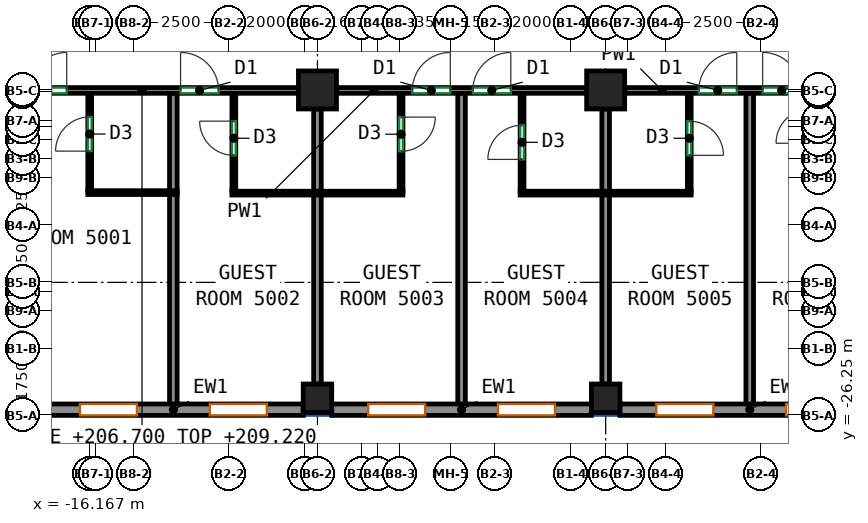
"""IFC4 building model, lengths in metres.
Left out: names, types, materials, properties, quantities, classifications, styles, units other than length and angle.
Written with IfcOpenShell. Run it as: python <this file> out.ifc"""

import sys

from ifc_helpers import new_model, si_unit, direction, frame, frame_2d, origin, origin_2d, place, context, subcontext, project, spatial, rectangle, extrude, source, transform, mapped, element, fill, save


model = new_model("IFC4")
c1 = context("Model", 3, precision=1e-05, world=origin(), true_north=direction((0.0, 1.0)))
c2 = subcontext(c1, "Body", "Model", "MODEL_VIEW")
j1 = project(units=[si_unit("LENGTHUNIT", "METRE"), si_unit("PLANEANGLEUNIT", "RADIAN")], contexts=[c1])
p1 = place(None, origin())
s1 = spatial("IfcSite", under=j1, at=p1, CompositionType="ELEMENT")
p2 = place(p1, origin())
s2 = spatial("IfcBuilding", under=s1, at=p2, CompositionType="ELEMENT")
p3 = place(p2, frame((0.0, 0.0, 206.7)))
s3 = spatial("IfcBuildingStorey", under=s2, at=p3, CompositionType="ELEMENT", Elevation=206.7)
m1 = source(origin(), c2, "Body", "SweptSolid", [
    extrude(rectangle(XDim=0.75, YDim=0.75, at=origin_2d()), origin(), (0.0, 0.0, 1.0), 3.12),
])
p4 = place(p3, frame((-10.167, -25.8, 0.0), z_axis=(0.0, 0.0, 1.0), x_axis=(1.0, 0.0, 0.0)))
e1 = element("IfcColumn", 1, at=p4, inside=s3, PredefinedType="COLUMN", context=c2, shape_type="MappedRepresentation", body=[
    mapped(m1, transform((0.0, 0.0, 0.0))),
])
m2 = source(origin(), c2, "Body", "SweptSolid", [
    extrude(rectangle(XDim=1.0, YDim=1.0, at=origin_2d()), origin(), (0.0, 0.0, 1.0), 3.12),
])
p5 = place(p3, frame((-10.167, -17.688, 0.0), z_axis=(0.0, 0.0, 1.0), x_axis=(1.0, 0.0, 0.0)))
e2 = element("IfcColumn", 2, at=p5, inside=s3, PredefinedType="COLUMN", context=c2, shape_type="MappedRepresentation", body=[
    mapped(m2, transform((0.0, 0.0, 0.0))),
])
p6 = place(p3, frame((-2.583, -25.8, 0.0), z_axis=(0.0, 0.0, 1.0), x_axis=(1.0, 0.0, 0.0)))
e3 = element("IfcColumn", 3, at=p6, inside=s3, PredefinedType="COLUMN", context=c2, shape_type="MappedRepresentation", body=[
    mapped(m1, transform((0.0, 0.0, 0.0))),
])
p7 = place(p3, frame((-2.583, -17.688, 0.0), z_axis=(0.0, 0.0, 1.0), x_axis=(1.0, 0.0, 0.0)))
e4 = element("IfcColumn", 4, at=p7, inside=s3, PredefinedType="COLUMN", context=c2, shape_type="MappedRepresentation", body=[
    mapped(m2, transform((0.0, 0.0, 0.0))),
])
m3 = source(origin(), c2, "Body", "SweptSolid", [
    extrude(rectangle(XDim=6.833, YDim=0.3, at=frame_2d((3.417, 0.0))), origin(), (0.0, 0.0, 1.0), 3.12),
])
p8 = place(p3, frame((-17.375, -26.1, 0.0), z_axis=(0.0, 0.0, 1.0), x_axis=(1.0, 0.0, 0.0)))
e5 = element("IfcWall", 5, at=p8, inside=s3, PredefinedType="SOLIDWALL", context=c2, shape_type="MappedRepresentation", body=[
    mapped(m3, transform((0.0, 0.0, 0.0))),
])
p9 = place(p8, frame((0.958, 0.0, 0.85)))
e6 = element("IfcOpeningElement", 6, at=p9, cuts=e5, PredefinedType="OPENING", context=c2, shape_type="SweptSolid", body=[
    extrude(rectangle(XDim=1.5, YDim=1.95, at=frame_2d((0.75, 0.975))), frame((0.0, 0.16, 0.0), z_axis=(0.0, -1.0, 0.0), x_axis=(1.0, 0.0, 0.0)), (0.0, 0.0, 1.0), 0.32),
])
p10 = place(p8, frame((4.375, 0.0, 0.85)))
e7 = element("IfcOpeningElement", 7, at=p10, cuts=e5, PredefinedType="OPENING", context=c2, shape_type="SweptSolid", body=[
    extrude(rectangle(XDim=1.5, YDim=1.95, at=frame_2d((0.75, 0.975))), frame((0.0, 0.16, 0.0), z_axis=(0.0, -1.0, 0.0), x_axis=(1.0, 0.0, 0.0)), (0.0, 0.0, 1.0), 0.32),
])
m4 = source(origin(), c2, "Body", "SweptSolid", [
    extrude(rectangle(XDim=6.833, YDim=0.3, at=frame_2d((3.417, 0.0))), origin(), (0.0, 0.0, 1.0), 3.12),
])
p11 = place(p3, frame((-9.792, -26.1, 0.0), z_axis=(0.0, 0.0, 1.0), x_axis=(1.0, 0.0, 0.0)))
e8 = element("IfcWall", 8, at=p11, inside=s3, PredefinedType="SOLIDWALL", context=c2, shape_type="MappedRepresentation", body=[
    mapped(m4, transform((0.0, 0.0, 0.0))),
])
p12 = place(p11, frame((0.958, 0.0, 0.85)))
e9 = element("IfcOpeningElement", 9, at=p12, cuts=e8, PredefinedType="OPENING", context=c2, shape_type="SweptSolid", body=[
    extrude(rectangle(XDim=1.5, YDim=1.95, at=frame_2d((0.75, 0.975))), frame((0.0, 0.16, 0.0), z_axis=(0.0, -1.0, 0.0), x_axis=(1.0, 0.0, 0.0)), (0.0, 0.0, 1.0), 0.32),
])
p13 = place(p11, frame((4.375, 0.0, 0.85)))
e10 = element("IfcOpeningElement", 10, at=p13, cuts=e8, PredefinedType="OPENING", context=c2, shape_type="SweptSolid", body=[
    extrude(rectangle(XDim=1.5, YDim=1.95, at=frame_2d((0.75, 0.975))), frame((0.0, 0.16, 0.0), z_axis=(0.0, -1.0, 0.0), x_axis=(1.0, 0.0, 0.0)), (0.0, 0.0, 1.0), 0.32),
])
p14 = place(p3, frame((-2.208, -26.1, 0.0), z_axis=(0.0, 0.0, 1.0), x_axis=(1.0, 0.0, 0.0)))
e11 = element("IfcWall", 11, at=p14, inside=s3, PredefinedType="SOLIDWALL", context=c2, shape_type="MappedRepresentation", body=[
    mapped(m3, transform((0.0, 0.0, 0.0))),
])
p15 = place(p14, frame((0.958, 0.0, 0.85)))
e12 = element("IfcOpeningElement", 12, at=p15, cuts=e11, PredefinedType="OPENING", context=c2, shape_type="SweptSolid", body=[
    extrude(rectangle(XDim=1.5, YDim=1.95, at=frame_2d((0.75, 0.975))), frame((0.0, 0.16, 0.0), z_axis=(0.0, -1.0, 0.0), x_axis=(1.0, 0.0, 0.0)), (0.0, 0.0, 1.0), 0.32),
])
p16 = place(p14, frame((4.375, 0.0, 0.85)))
e13 = element("IfcOpeningElement", 13, at=p16, cuts=e11, PredefinedType="OPENING", context=c2, shape_type="SweptSolid", body=[
    extrude(rectangle(XDim=1.5, YDim=1.95, at=frame_2d((0.75, 0.975))), frame((0.0, 0.16, 0.0), z_axis=(0.0, -1.0, 0.0), x_axis=(1.0, 0.0, 0.0)), (0.0, 0.0, 1.0), 0.32),
])
p17 = place(p3, frame((-18.9, -17.7, 0.0), z_axis=(0.0, 0.0, 1.0), x_axis=(1.0, 0.0, 0.0)))
e14 = element("IfcWall", 14, at=p17, inside=s3, PredefinedType="PARTITIONING", context=c2, shape_type="SweptSolid", body=[
    extrude(rectangle(XDim=8.233, YDim=0.15, at=frame_2d((4.116, 0.0))), origin(), (0.0, 0.0, 1.0), 2.52),
])
p18 = place(p17, frame((1.135, 0.0, 0.0)))
e15 = element("IfcOpeningElement", 15, at=p18, cuts=e14, PredefinedType="OPENING", context=c2, shape_type="SweptSolid", body=[
    extrude(rectangle(XDim=1.0, YDim=2.1, at=frame_2d((0.5, 1.05))), frame((0.0, 0.085, 0.0), z_axis=(0.0, -1.0, 0.0), x_axis=(1.0, 0.0, 0.0)), (0.0, 0.0, 1.0), 0.17),
])
p19 = place(p17, frame((5.131, 0.0, 0.0)))
e16 = element("IfcOpeningElement", 16, at=p19, cuts=e14, PredefinedType="OPENING", context=c2, shape_type="SweptSolid", body=[
    extrude(rectangle(XDim=1.0, YDim=2.1, at=frame_2d((0.5, 1.05))), frame((0.0, 0.085, 0.0), z_axis=(0.0, -1.0, 0.0), x_axis=(1.0, 0.0, 0.0)), (0.0, 0.0, 1.0), 0.17),
])
p20 = place(p3, frame((-9.667, -17.7, 0.0), z_axis=(0.0, 0.0, 1.0), x_axis=(1.0, 0.0, 0.0)))
e17 = element("IfcWall", 17, at=p20, inside=s3, PredefinedType="PARTITIONING", context=c2, shape_type="SweptSolid", body=[
    extrude(rectangle(XDim=6.584, YDim=0.15, at=frame_2d((3.292, 0.0))), origin(), (0.0, 0.0, 1.0), 3.12),
])
p21 = place(p20, frame((1.996, 0.0, 0.0)))
e18 = element("IfcOpeningElement", 18, at=p21, cuts=e17, PredefinedType="OPENING", context=c2, shape_type="SweptSolid", body=[
    extrude(rectangle(XDim=1.0, YDim=2.1, at=frame_2d((0.5, 1.05))), frame((0.0, 0.085, 0.0), z_axis=(0.0, -1.0, 0.0), x_axis=(1.0, 0.0, 0.0)), (0.0, 0.0, 1.0), 0.17),
])
p22 = place(p20, frame((3.588, 0.0, 0.0)))
e19 = element("IfcOpeningElement", 19, at=p22, cuts=e17, PredefinedType="OPENING", context=c2, shape_type="SweptSolid", body=[
    extrude(rectangle(XDim=1.0, YDim=2.1, at=frame_2d((0.5, 1.05))), frame((0.0, 0.085, 0.0), z_axis=(0.0, -1.0, 0.0), x_axis=(1.0, 0.0, 0.0)), (0.0, 0.0, 1.0), 0.17),
])
p23 = place(p3, frame((-2.083, -17.7, 0.0), z_axis=(0.0, 0.0, 1.0), x_axis=(1.0, 0.0, 0.0)))
e20 = element("IfcWall", 20, at=p23, inside=s3, PredefinedType="PARTITIONING", context=c2, shape_type="SweptSolid", body=[
    extrude(rectangle(XDim=6.583, YDim=0.15, at=frame_2d((3.292, 0.0))), origin(), (0.0, 0.0, 1.0), 3.12),
])
p24 = place(p23, frame((1.95, 0.0, 0.0)))
e21 = element("IfcOpeningElement", 21, at=p24, cuts=e20, PredefinedType="OPENING", context=c2, shape_type="SweptSolid", body=[
    extrude(rectangle(XDim=1.0, YDim=2.1, at=frame_2d((0.5, 1.05))), frame((0.0, 0.085, 0.0), z_axis=(0.0, -1.0, 0.0), x_axis=(1.0, 0.0, 0.0)), (0.0, 0.0, 1.0), 0.17),
])
p25 = place(p23, frame((3.632, 0.0, 0.0)))
e22 = element("IfcOpeningElement", 22, at=p25, cuts=e20, PredefinedType="OPENING", context=c2, shape_type="SweptSolid", body=[
    extrude(rectangle(XDim=1.0, YDim=2.1, at=frame_2d((0.5, 1.05))), frame((0.0, 0.085, 0.0), z_axis=(0.0, -1.0, 0.0), x_axis=(1.0, 0.0, 0.0)), (0.0, 0.0, 1.0), 0.17),
])
p26 = place(p3, frame((-16.159, -20.338, 0.0), z_axis=(0.0, 0.0, 1.0), x_axis=(0.0, 1.0, 0.0)))
e23 = element("IfcWall", 23, at=p26, inside=s3, PredefinedType="PARTITIONING", context=c2, shape_type="SweptSolid", body=[
    extrude(rectangle(XDim=2.561, YDim=0.1, at=frame_2d((1.28, 0.0))), origin(), (0.0, 0.0, 1.0), 3.12),
])
p27 = place(p26, frame((1.041, 0.0, 0.0)))
e24 = element("IfcOpeningElement", 24, at=p27, cuts=e23, PredefinedType="OPENING", context=c2, shape_type="SweptSolid", body=[
    extrude(rectangle(XDim=0.9, YDim=2.1, at=frame_2d((0.45, 1.05))), frame((0.0, 0.06, 0.0), z_axis=(0.0, -1.0, 0.0), x_axis=(1.0, 0.0, 0.0)), (0.0, 0.0, 1.0), 0.12),
])
p28 = place(p3, frame((-16.209, -20.388, 0.0), z_axis=(0.0, 0.0, 1.0), x_axis=(1.0, 0.0, 0.0)))
e25 = element("IfcWall", 25, at=p28, inside=s3, PredefinedType="PARTITIONING", context=c2, shape_type="SweptSolid", body=[
    extrude(rectangle(XDim=2.35, YDim=0.1, at=frame_2d((1.175, 0.0))), origin(), (0.0, 0.0, 1.0), 3.12),
])
p29 = place(p3, frame((-13.959, -26.0, 0.0), z_axis=(0.0, 0.0, 1.0), x_axis=(0.0, 1.0, 0.0)))
e26 = element("IfcWall", 26, at=p29, inside=s3, PredefinedType="PARTITIONING", context=c2, shape_type="SweptSolid", body=[
    extrude(rectangle(XDim=5.562, YDim=0.2, at=frame_2d((2.781, 0.0))), origin(), (0.0, 0.0, 1.0), 3.12),
])
p30 = place(p3, frame((-13.959, -20.338, 0.0), z_axis=(0.0, 0.0, 1.0), x_axis=(0.0, 1.0, 0.0)))
e27 = element("IfcWall", 27, at=p30, inside=s3, PredefinedType="PARTITIONING", context=c2, shape_type="SweptSolid", body=[
    extrude(rectangle(XDim=2.561, YDim=0.2, at=frame_2d((1.28, 0.0))), origin(), (0.0, 0.0, 1.0), 3.12),
])
p31 = place(p3, frame((-12.367, -20.352, 0.0), z_axis=(0.0, 0.0, 1.0), x_axis=(0.0, 1.0, 0.0)))
e28 = element("IfcWall", 28, at=p31, inside=s3, PredefinedType="PARTITIONING", context=c2, shape_type="SweptSolid", body=[
    extrude(rectangle(XDim=2.575, YDim=0.1, at=frame_2d((1.288, 0.0))), origin(), (0.0, 0.0, 1.0), 3.12),
])
p32 = place(p31, frame((0.944, 0.0, 0.0)))
e29 = element("IfcOpeningElement", 29, at=p32, cuts=e28, PredefinedType="OPENING", context=c2, shape_type="SweptSolid", body=[
    extrude(rectangle(XDim=0.9, YDim=2.1, at=frame_2d((0.45, 1.05))), frame((0.0, 0.06, 0.0), z_axis=(0.0, -1.0, 0.0), x_axis=(1.0, 0.0, 0.0)), (0.0, 0.0, 1.0), 0.12),
])
p33 = place(p3, frame((-12.417, -20.402, 0.0), z_axis=(0.0, 0.0, 1.0), x_axis=(1.0, 0.0, 0.0)))
e30 = element("IfcWall", 30, at=p33, inside=s3, PredefinedType="PARTITIONING", context=c2, shape_type="SweptSolid", body=[
    extrude(rectangle(XDim=4.5, YDim=0.1, at=frame_2d((2.25, 0.0))), origin(), (0.0, 0.0, 1.0), 3.12),
])
p34 = place(p3, frame((-10.167, -25.425, 0.0), z_axis=(0.0, 0.0, 1.0), x_axis=(0.0, 1.0, 0.0)))
e31 = element("IfcWall", 31, at=p34, inside=s3, PredefinedType="PARTITIONING", context=c2, shape_type="SweptSolid", body=[
    extrude(rectangle(XDim=4.973, YDim=0.2, at=frame_2d((2.487, 0.0))), origin(), (0.0, 0.0, 1.0), 3.12),
])
p35 = place(p3, frame((-10.167, -20.352, 0.0), z_axis=(0.0, 0.0, 1.0), x_axis=(0.0, 1.0, 0.0)))
e32 = element("IfcWall", 32, at=p35, inside=s3, PredefinedType="PARTITIONING", context=c2, shape_type="SweptSolid", body=[
    extrude(rectangle(XDim=2.164, YDim=0.2, at=frame_2d((1.082, 0.0))), origin(), (0.0, 0.0, 1.0), 3.12),
])
p36 = place(p3, frame((-7.967, -17.777, 0.0), z_axis=(0.0, 0.0, 1.0), x_axis=(0.0, -1.0, 0.0)))
e33 = element("IfcWall", 33, at=p36, inside=s3, PredefinedType="PARTITIONING", context=c2, shape_type="SweptSolid", body=[
    extrude(rectangle(XDim=2.575, YDim=0.1, at=frame_2d((1.288, 0.0))), origin(), (0.0, 0.0, 1.0), 3.12),
])
p37 = place(p36, frame((0.625, 0.0, 0.0)))
e34 = element("IfcOpeningElement", 34, at=p37, cuts=e33, PredefinedType="OPENING", context=c2, shape_type="SweptSolid", body=[
    extrude(rectangle(XDim=0.9, YDim=2.1, at=frame_2d((0.45, 1.05))), frame((0.0, 0.06, 0.0), z_axis=(0.0, -1.0, 0.0), x_axis=(1.0, 0.0, 0.0)), (0.0, 0.0, 1.0), 0.12),
])
p38 = place(p3, frame((-6.375, -26.0, 0.0), z_axis=(0.0, 0.0, 1.0), x_axis=(0.0, 1.0, 0.0)))
e35 = element("IfcWall", 35, at=p38, inside=s3, PredefinedType="PARTITIONING", context=c2, shape_type="SweptSolid", body=[
    extrude(rectangle(XDim=8.223, YDim=0.2, at=frame_2d((4.111, 0.0))), origin(), (0.0, 0.0, 1.0), 3.12),
])
p39 = place(p3, frame((-4.783, -20.352, 0.0), z_axis=(0.0, 0.0, 1.0), x_axis=(0.0, 1.0, 0.0)))
e36 = element("IfcWall", 36, at=p39, inside=s3, PredefinedType="PARTITIONING", context=c2, shape_type="SweptSolid", body=[
    extrude(rectangle(XDim=2.575, YDim=0.1, at=frame_2d((1.288, 0.0))), origin(), (0.0, 0.0, 1.0), 3.12),
])
p40 = place(p39, frame((0.837, 0.0, 0.0)))
e37 = element("IfcOpeningElement", 37, at=p40, cuts=e36, PredefinedType="OPENING", context=c2, shape_type="SweptSolid", body=[
    extrude(rectangle(XDim=0.9, YDim=2.1, at=frame_2d((0.45, 1.05))), frame((0.0, 0.06, 0.0), z_axis=(0.0, -1.0, 0.0), x_axis=(1.0, 0.0, 0.0)), (0.0, 0.0, 1.0), 0.12),
])
p41 = place(p3, frame((-4.833, -20.402, 0.0), z_axis=(0.0, 0.0, 1.0), x_axis=(1.0, 0.0, 0.0)))
e38 = element("IfcWall", 38, at=p41, inside=s3, PredefinedType="PARTITIONING", context=c2, shape_type="SweptSolid", body=[
    extrude(rectangle(XDim=4.5, YDim=0.1, at=frame_2d((2.25, 0.0))), origin(), (0.0, 0.0, 1.0), 3.12),
])
p42 = place(p3, frame((-2.583, -25.425, 0.0), z_axis=(0.0, 0.0, 1.0), x_axis=(0.0, 1.0, 0.0)))
e39 = element("IfcWall", 39, at=p42, inside=s3, PredefinedType="PARTITIONING", context=c2, shape_type="SweptSolid", body=[
    extrude(rectangle(XDim=4.973, YDim=0.2, at=frame_2d((2.487, 0.0))), origin(), (0.0, 0.0, 1.0), 3.12),
])
p43 = place(p3, frame((-2.583, -20.352, 0.0), z_axis=(0.0, 0.0, 1.0), x_axis=(0.0, 1.0, 0.0)))
e40 = element("IfcWall", 40, at=p43, inside=s3, PredefinedType="PARTITIONING", context=c2, shape_type="SweptSolid", body=[
    extrude(rectangle(XDim=2.164, YDim=0.2, at=frame_2d((1.082, 0.0))), origin(), (0.0, 0.0, 1.0), 3.12),
])
p44 = place(p3, frame((-0.383, -17.777, 0.0), z_axis=(0.0, 0.0, 1.0), x_axis=(0.0, -1.0, 0.0)))
e41 = element("IfcWall", 41, at=p44, inside=s3, PredefinedType="PARTITIONING", context=c2, shape_type="SweptSolid", body=[
    extrude(rectangle(XDim=2.575, YDim=0.1, at=frame_2d((1.288, 0.0))), origin(), (0.0, 0.0, 1.0), 3.12),
])
p45 = place(p44, frame((0.731, 0.0, 0.0)))
e42 = element("IfcOpeningElement", 42, at=p45, cuts=e41, PredefinedType="OPENING", context=c2, shape_type="SweptSolid", body=[
    extrude(rectangle(XDim=0.9, YDim=2.1, at=frame_2d((0.45, 1.05))), frame((0.0, 0.06, 0.0), z_axis=(0.0, -1.0, 0.0), x_axis=(1.0, 0.0, 0.0)), (0.0, 0.0, 1.0), 0.12),
])
p46 = place(p3, frame((1.208, -26.0, 0.0), z_axis=(0.0, 0.0, 1.0), x_axis=(0.0, 1.0, 0.0)))
e43 = element("IfcWall", 43, at=p46, inside=s3, PredefinedType="PARTITIONING", context=c2, shape_type="SweptSolid", body=[
    extrude(rectangle(XDim=8.223, YDim=0.2, at=frame_2d((4.111, 0.0))), origin(), (0.0, 0.0, 1.0), 3.12),
])
p47 = place(p9, origin())
e44 = element("IfcWindow", 44, at=p47, inside=s3, PartitioningType="SINGLE_PANEL", PredefinedType="WINDOW", context=c2, shape_type="SweptSolid", body=[
    extrude(rectangle(XDim=1.5, YDim=1.95, at=frame_2d((0.75, 0.975))), frame((0.0, 0.03, 0.0), z_axis=(0.0, -1.0, 0.0), x_axis=(1.0, 0.0, 0.0)), (0.0, 0.0, 1.0), 0.06),
])
fill(e6, e44)
p48 = place(p10, origin())
e45 = element("IfcWindow", 45, at=p48, inside=s3, PartitioningType="SINGLE_PANEL", PredefinedType="WINDOW", context=c2, shape_type="SweptSolid", body=[
    extrude(rectangle(XDim=1.5, YDim=1.95, at=frame_2d((0.75, 0.975))), frame((0.0, 0.03, 0.0), z_axis=(0.0, -1.0, 0.0), x_axis=(1.0, 0.0, 0.0)), (0.0, 0.0, 1.0), 0.06),
])
fill(e7, e45)
p49 = place(p12, origin())
e46 = element("IfcWindow", 46, at=p49, inside=s3, PartitioningType="SINGLE_PANEL", PredefinedType="WINDOW", context=c2, shape_type="SweptSolid", body=[
    extrude(rectangle(XDim=1.5, YDim=1.95, at=frame_2d((0.75, 0.975))), frame((0.0, 0.03, 0.0), z_axis=(0.0, -1.0, 0.0), x_axis=(1.0, 0.0, 0.0)), (0.0, 0.0, 1.0), 0.06),
])
fill(e9, e46)
p50 = place(p13, origin())
e47 = element("IfcWindow", 47, at=p50, inside=s3, PartitioningType="SINGLE_PANEL", PredefinedType="WINDOW", context=c2, shape_type="SweptSolid", body=[
    extrude(rectangle(XDim=1.5, YDim=1.95, at=frame_2d((0.75, 0.975))), frame((0.0, 0.03, 0.0), z_axis=(0.0, -1.0, 0.0), x_axis=(1.0, 0.0, 0.0)), (0.0, 0.0, 1.0), 0.06),
])
fill(e10, e47)
p51 = place(p15, origin())
e48 = element("IfcWindow", 48, at=p51, inside=s3, PartitioningType="SINGLE_PANEL", PredefinedType="WINDOW", context=c2, shape_type="SweptSolid", body=[
    extrude(rectangle(XDim=1.5, YDim=1.95, at=frame_2d((0.75, 0.975))), frame((0.0, 0.03, 0.0), z_axis=(0.0, -1.0, 0.0), x_axis=(1.0, 0.0, 0.0)), (0.0, 0.0, 1.0), 0.06),
])
fill(e12, e48)
p52 = place(p16, origin())
e49 = element("IfcWindow", 49, at=p52, inside=s3, PartitioningType="SINGLE_PANEL", PredefinedType="WINDOW", context=c2, shape_type="SweptSolid", body=[
    extrude(rectangle(XDim=1.5, YDim=1.95, at=frame_2d((0.75, 0.975))), frame((0.0, 0.03, 0.0), z_axis=(0.0, -1.0, 0.0), x_axis=(1.0, 0.0, 0.0)), (0.0, 0.0, 1.0), 0.06),
])
fill(e13, e49)
p53 = place(p40, origin())
e50 = element("IfcDoor", 50, at=p53, inside=s3, OperationType="SINGLE_SWING_LEFT", PredefinedType="DOOR", context=c2, shape_type="SweptSolid", body=[
    extrude(rectangle(XDim=0.9, YDim=2.1, at=frame_2d((0.45, 1.05))), frame((0.0, 0.025, 0.0), z_axis=(0.0, -1.0, 0.0), x_axis=(1.0, 0.0, 0.0)), (0.0, 0.0, 1.0), 0.05),
])
fill(e37, e50)
p54 = place(p32, origin())
e51 = element("IfcDoor", 51, at=p54, inside=s3, OperationType="SINGLE_SWING_RIGHT", PredefinedType="DOOR", context=c2, shape_type="SweptSolid", body=[
    extrude(rectangle(XDim=0.9, YDim=2.1, at=frame_2d((0.45, 1.05))), frame((0.0, 0.025, 0.0), z_axis=(0.0, -1.0, 0.0), x_axis=(1.0, 0.0, 0.0)), (0.0, 0.0, 1.0), 0.05),
])
fill(e29, e51)
p55 = place(p45, origin())
e52 = element("IfcDoor", 52, at=p55, inside=s3, OperationType="SINGLE_SWING_RIGHT", PredefinedType="DOOR", context=c2, shape_type="SweptSolid", body=[
    extrude(rectangle(XDim=0.9, YDim=2.1, at=frame_2d((0.45, 1.05))), frame((0.0, 0.025, 0.0), z_axis=(0.0, -1.0, 0.0), x_axis=(1.0, 0.0, 0.0)), (0.0, 0.0, 1.0), 0.05),
])
fill(e42, e52)
p56 = place(p27, origin())
e53 = element("IfcDoor", 53, at=p56, inside=s3, OperationType="SINGLE_SWING_LEFT", PredefinedType="DOOR", context=c2, shape_type="SweptSolid", body=[
    extrude(rectangle(XDim=0.9, YDim=2.1, at=frame_2d((0.45, 1.05))), frame((0.0, 0.025, 0.0), z_axis=(0.0, -1.0, 0.0), x_axis=(1.0, 0.0, 0.0)), (0.0, 0.0, 1.0), 0.05),
])
fill(e24, e53)
p57 = place(p37, origin())
e54 = element("IfcDoor", 54, at=p57, inside=s3, OperationType="SINGLE_SWING_LEFT", PredefinedType="DOOR", context=c2, shape_type="SweptSolid", body=[
    extrude(rectangle(XDim=0.9, YDim=2.1, at=frame_2d((0.45, 1.05))), frame((0.0, 0.025, 0.0), z_axis=(0.0, -1.0, 0.0), x_axis=(1.0, 0.0, 0.0)), (0.0, 0.0, 1.0), 0.05),
])
fill(e34, e54)
p58 = place(p18, origin())
e55 = element("IfcDoor", 55, at=p58, inside=s3, OperationType="SINGLE_SWING_RIGHT", PredefinedType="DOOR", context=c2, shape_type="SweptSolid", body=[
    extrude(rectangle(XDim=1.0, YDim=2.1, at=frame_2d((0.5, 1.05))), frame((0.0, 0.025, 0.0), z_axis=(0.0, -1.0, 0.0), x_axis=(1.0, 0.0, 0.0)), (0.0, 0.0, 1.0), 0.05),
])
fill(e15, e55)
p59 = place(p19, origin())
e56 = element("IfcDoor", 56, at=p59, inside=s3, OperationType="SINGLE_SWING_LEFT", PredefinedType="DOOR", context=c2, shape_type="SweptSolid", body=[
    extrude(rectangle(XDim=1.0, YDim=2.1, at=frame_2d((0.5, 1.05))), frame((0.0, 0.025, 0.0), z_axis=(0.0, -1.0, 0.0), x_axis=(1.0, 0.0, 0.0)), (0.0, 0.0, 1.0), 0.05),
])
fill(e16, e56)
p60 = place(p21, origin())
e57 = element("IfcDoor", 57, at=p60, inside=s3, OperationType="SINGLE_SWING_RIGHT", PredefinedType="DOOR", context=c2, shape_type="SweptSolid", body=[
    extrude(rectangle(XDim=1.0, YDim=2.1, at=frame_2d((0.5, 1.05))), frame((0.0, 0.025, 0.0), z_axis=(0.0, -1.0, 0.0), x_axis=(1.0, 0.0, 0.0)), (0.0, 0.0, 1.0), 0.05),
])
fill(e18, e57)
p61 = place(p22, origin())
e58 = element("IfcDoor", 58, at=p61, inside=s3, OperationType="SINGLE_SWING_RIGHT", PredefinedType="DOOR", context=c2, shape_type="SweptSolid", body=[
    extrude(rectangle(XDim=1.0, YDim=2.1, at=frame_2d((0.5, 1.05))), frame((0.0, 0.025, 0.0), z_axis=(0.0, -1.0, 0.0), x_axis=(1.0, 0.0, 0.0)), (0.0, 0.0, 1.0), 0.05),
])
fill(e19, e58)
p62 = place(p24, origin())
e59 = element("IfcDoor", 59, at=p62, inside=s3, OperationType="SINGLE_SWING_RIGHT", PredefinedType="DOOR", context=c2, shape_type="SweptSolid", body=[
    extrude(rectangle(XDim=1.0, YDim=2.1, at=frame_2d((0.5, 1.05))), frame((0.0, 0.025, 0.0), z_axis=(0.0, -1.0, 0.0), x_axis=(1.0, 0.0, 0.0)), (0.0, 0.0, 1.0), 0.05),
])
fill(e21, e59)
p63 = place(p25, origin())
e60 = element("IfcDoor", 60, at=p63, inside=s3, OperationType="SINGLE_SWING_LEFT", PredefinedType="DOOR", context=c2, shape_type="SweptSolid", body=[
    extrude(rectangle(XDim=1.0, YDim=2.1, at=frame_2d((0.5, 1.05))), frame((0.0, 0.025, 0.0), z_axis=(0.0, -1.0, 0.0), x_axis=(1.0, 0.0, 0.0)), (0.0, 0.0, 1.0), 0.05),
])
fill(e22, e60)
save(model, sys.argv[1])
